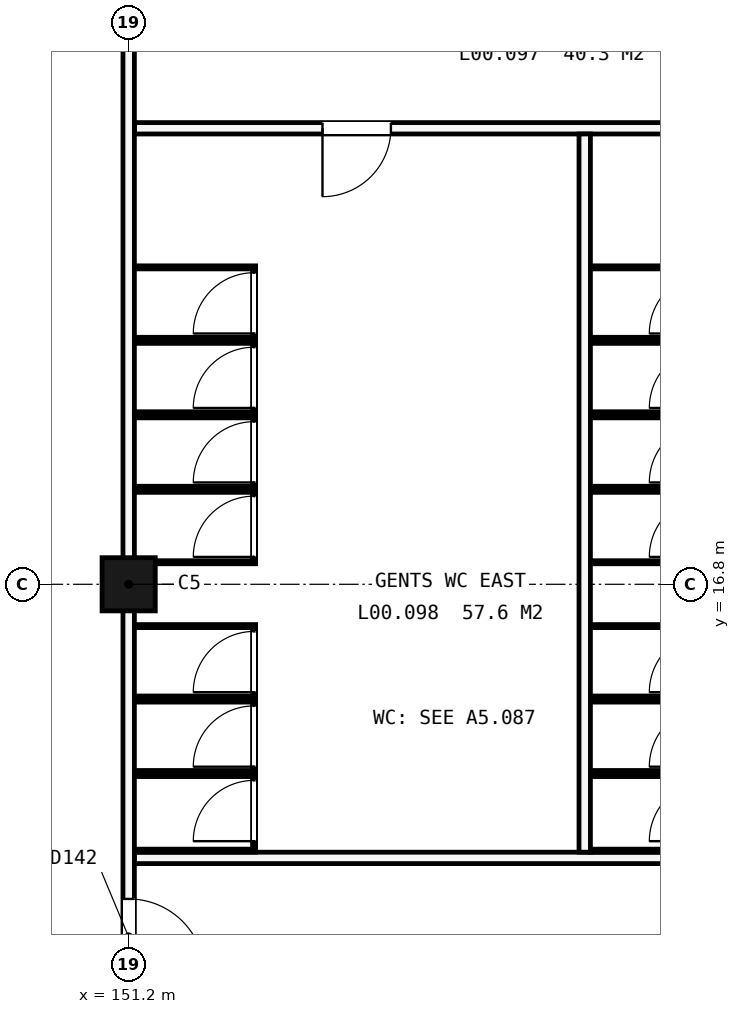
"""IFC4 building model, lengths in metres.
Left out: names, types, materials, properties, quantities, classifications, styles, units other than length and angle.
Written with IfcOpenShell. Run it as: python <this file> out.ifc"""

import sys

from ifc_helpers import new_model, si_unit, direction, frame, frame_2d, origin, origin_2d, place, context, subcontext, project, spatial, rectangle, extrude, element, fill, save


model = new_model("IFC4")
c1 = context("Model", 3, precision=1e-05, world=origin(), true_north=direction((0.0, 1.0)))
c2 = subcontext(c1, "Body", "Model", "MODEL_VIEW")
j1 = project(units=[si_unit("LENGTHUNIT", "METRE"), si_unit("PLANEANGLEUNIT", "RADIAN")], contexts=[c1])
p1 = place(None, origin())
s1 = spatial("IfcSite", under=j1, at=p1, CompositionType="ELEMENT")
p2 = place(p1, origin())
s2 = spatial("IfcBuilding", under=s1, at=p2, CompositionType="ELEMENT")
p3 = place(p2, origin())
s3 = spatial("IfcBuildingStorey", under=s2, at=p3, CompositionType="ELEMENT", Elevation=0.0)
p4 = place(p3, frame((151.2, 16.8, -0.3), z_axis=(0.0, 0.0, 1.0), x_axis=(1.0, 0.0, 0.0)))
e1 = element("IfcColumn", 1, at=p4, inside=s3, PredefinedType="COLUMN", context=c2, shape_type="SweptSolid", body=[
    extrude(rectangle(XDim=0.7, YDim=0.7, at=origin_2d()), origin(), (0.0, 0.0, 1.0), 5.4),
])
p5 = place(p3, frame((151.275, 13.2, 0.0), z_axis=(0.0, 0.0, 1.0), x_axis=(1.0, 0.0, 0.0)))
e2 = element("IfcWall", 2, at=p5, inside=s3, PredefinedType="PARTITIONING", context=c2, shape_type="SweptSolid", body=[
    extrude(rectangle(XDim=16.55, YDim=0.15, at=frame_2d((8.275, 0.0))), origin(), (0.0, 0.0, 1.0), 5.1),
])
p6 = place(p5, frame((13.825, 0.0, 0.0)))
e3 = element("IfcOpeningElement", 3, at=p6, cuts=e2, PredefinedType="OPENING", context=c2, shape_type="SweptSolid", body=[
    extrude(rectangle(XDim=1.0, YDim=2.1, at=frame_2d((0.5, 1.05))), frame((0.0, 0.085, 0.0), z_axis=(0.0, -1.0, 0.0), x_axis=(1.0, 0.0, 0.0)), (0.0, 0.0, 1.0), 0.17),
])
p7 = place(p3, frame((151.275, 22.8, 0.0), z_axis=(0.0, 0.0, 1.0), x_axis=(1.0, 0.0, 0.0)))
e4 = element("IfcWall", 4, at=p7, inside=s3, PredefinedType="PARTITIONING", context=c2, shape_type="SweptSolid", body=[
    extrude(rectangle(XDim=16.55, YDim=0.15, at=frame_2d((8.275, 0.0))), origin(), (0.0, 0.0, 1.0), 5.1),
])
p8 = place(p7, frame((2.475, 0.0, 0.0)))
e5 = element("IfcOpeningElement", 5, at=p8, cuts=e4, PredefinedType="OPENING", context=c2, shape_type="SweptSolid", body=[
    extrude(rectangle(XDim=0.9, YDim=2.1, at=frame_2d((0.45, 1.05))), frame((0.0, 0.085, 0.0), z_axis=(0.0, -1.0, 0.0), x_axis=(1.0, 0.0, 0.0)), (0.0, 0.0, 1.0), 0.17),
])
p9 = place(p7, frame((8.475, 0.0, 0.0)))
e6 = element("IfcOpeningElement", 6, at=p9, cuts=e4, PredefinedType="OPENING", context=c2, shape_type="SweptSolid", body=[
    extrude(rectangle(XDim=0.9, YDim=2.1, at=frame_2d((0.45, 1.05))), frame((0.0, 0.085, 0.0), z_axis=(0.0, -1.0, 0.0), x_axis=(1.0, 0.0, 0.0)), (0.0, 0.0, 1.0), 0.17),
])
p10 = place(p7, frame((13.8, 0.0, 0.0)))
e7 = element("IfcOpeningElement", 7, at=p10, cuts=e4, PredefinedType="OPENING", context=c2, shape_type="SweptSolid", body=[
    extrude(rectangle(XDim=1.05, YDim=2.25, at=frame_2d((0.525, 1.125))), frame((0.0, 0.085, 0.0), z_axis=(0.0, -1.0, 0.0), x_axis=(1.0, 0.0, 0.0)), (0.0, 0.0, 1.0), 0.17),
])
p11 = place(p3, frame((151.2, 8.5, 0.0), z_axis=(0.0, 0.0, 1.0), x_axis=(0.0, 1.0, 0.0)))
e8 = element("IfcWall", 8, at=p11, inside=s3, PredefinedType="PARTITIONING", context=c2, shape_type="SweptSolid", body=[
    extrude(rectangle(XDim=16.625, YDim=0.15, at=frame_2d((8.312, 0.0))), origin(), (0.0, 0.0, 1.0), 4.3),
])
p12 = place(p11, frame((3.16, 0.0, 0.0)))
e9 = element("IfcOpeningElement", 9, at=p12, cuts=e8, PredefinedType="OPENING", context=c2, shape_type="SweptSolid", body=[
    extrude(rectangle(XDim=1.0, YDim=2.1, at=frame_2d((0.5, 1.05))), frame((0.0, 0.085, 0.0), z_axis=(0.0, -1.0, 0.0), x_axis=(1.0, 0.0, 0.0)), (0.0, 0.0, 1.0), 0.17),
])
p13 = place(p3, frame((157.2, 13.275, 0.0), z_axis=(0.0, 0.0, 1.0), x_axis=(0.0, 1.0, 0.0)))
e10 = element("IfcWall", 10, at=p13, inside=s3, PredefinedType="PARTITIONING", context=c2, shape_type="SweptSolid", body=[
    extrude(rectangle(XDim=9.45, YDim=0.15, at=frame_2d((4.725, 0.0))), origin(), (0.0, 0.0, 1.0), 5.1),
])
for number, where, z_axis, x_axis in (
    (11, (151.275, 13.295, 0.0), (0.0, 0.0, 1.0), (1.0, 0.0, 0.0)),
    (12, (151.275, 14.29, 0.0), (0.0, 0.0, 1.0), (1.0, 0.0, 0.0)),
):
    element("IfcWall", number, at=place(p3, frame(where, z_axis=z_axis, x_axis=x_axis)), inside=s3, PredefinedType="PARTITIONING", context=c2, shape_type="SweptSolid", body=[
        extrude(rectangle(XDim=1.595, YDim=0.04, at=frame_2d((0.798, 0.0))), origin(), (0.0, 0.0, 1.0), 2.0),
    ])
p14 = place(p3, frame((152.85, 13.315, 0.0), z_axis=(0.0, 0.0, 1.0), x_axis=(0.0, 1.0, 0.0)))
e13 = element("IfcWall", 13, at=p14, inside=s3, PredefinedType="PARTITIONING", context=c2, shape_type="SweptSolid", body=[
    extrude(rectangle(XDim=0.955, YDim=0.04, at=frame_2d((0.478, 0.0))), origin(), (0.0, 0.0, 1.0), 2.0),
])
p15 = place(p14, frame((0.105, 0.0, 0.0)))
e14 = element("IfcOpeningElement", 14, at=p15, cuts=e13, PredefinedType="OPENING", context=c2, shape_type="SweptSolid", body=[
    extrude(rectangle(XDim=0.8, YDim=2.0, at=frame_2d((0.4, 1.0))), frame((0.0, 0.03, 0.0), z_axis=(0.0, -1.0, 0.0), x_axis=(1.0, 0.0, 0.0)), (0.0, 0.0, 1.0), 0.06),
])
for number, where, z_axis, x_axis in (
    (15, (151.275, 14.33, 0.0), (0.0, 0.0, 1.0), (1.0, 0.0, 0.0)),
    (16, (151.275, 15.27, 0.0), (0.0, 0.0, 1.0), (1.0, 0.0, 0.0)),
):
    element("IfcWall", number, at=place(p3, frame(where, z_axis=z_axis, x_axis=x_axis)), inside=s3, PredefinedType="PARTITIONING", context=c2, shape_type="SweptSolid", body=[
        extrude(rectangle(XDim=1.595, YDim=0.04, at=frame_2d((0.798, 0.0))), origin(), (0.0, 0.0, 1.0), 2.0),
    ])
p16 = place(p3, frame((152.85, 14.35, 0.0), z_axis=(0.0, 0.0, 1.0), x_axis=(0.0, 1.0, 0.0)))
e17 = element("IfcWall", 17, at=p16, inside=s3, PredefinedType="PARTITIONING", context=c2, shape_type="SweptSolid", body=[
    extrude(rectangle(XDim=0.9, YDim=0.04, at=frame_2d((0.45, 0.0))), origin(), (0.0, 0.0, 1.0), 2.0),
])
p17 = place(p16, frame((0.05, 0.0, 0.0)))
e18 = element("IfcOpeningElement", 18, at=p17, cuts=e17, PredefinedType="OPENING", context=c2, shape_type="SweptSolid", body=[
    extrude(rectangle(XDim=0.8, YDim=2.0, at=frame_2d((0.4, 1.0))), frame((0.0, 0.03, 0.0), z_axis=(0.0, -1.0, 0.0), x_axis=(1.0, 0.0, 0.0)), (0.0, 0.0, 1.0), 0.06),
])
for number, where, z_axis, x_axis in (
    (19, (151.275, 15.31, 0.0), (0.0, 0.0, 1.0), (1.0, 0.0, 0.0)),
    (20, (151.275, 16.25, 0.0), (0.0, 0.0, 1.0), (1.0, 0.0, 0.0)),
):
    element("IfcWall", number, at=place(p3, frame(where, z_axis=z_axis, x_axis=x_axis)), inside=s3, PredefinedType="PARTITIONING", context=c2, shape_type="SweptSolid", body=[
        extrude(rectangle(XDim=1.595, YDim=0.04, at=frame_2d((0.798, 0.0))), origin(), (0.0, 0.0, 1.0), 2.0),
    ])
p18 = place(p3, frame((152.85, 15.33, 0.0), z_axis=(0.0, 0.0, 1.0), x_axis=(0.0, 1.0, 0.0)))
e21 = element("IfcWall", 21, at=p18, inside=s3, PredefinedType="PARTITIONING", context=c2, shape_type="SweptSolid", body=[
    extrude(rectangle(XDim=0.9, YDim=0.04, at=frame_2d((0.45, 0.0))), origin(), (0.0, 0.0, 1.0), 2.0),
])
p19 = place(p18, frame((0.05, 0.0, 0.0)))
e22 = element("IfcOpeningElement", 22, at=p19, cuts=e21, PredefinedType="OPENING", context=c2, shape_type="SweptSolid", body=[
    extrude(rectangle(XDim=0.8, YDim=2.0, at=frame_2d((0.4, 1.0))), frame((0.0, 0.03, 0.0), z_axis=(0.0, -1.0, 0.0), x_axis=(1.0, 0.0, 0.0)), (0.0, 0.0, 1.0), 0.06),
])
for number, where, z_axis, x_axis in (
    (23, (151.275, 17.09, 0.0), (0.0, 0.0, 1.0), (1.0, 0.0, 0.0)),
    (24, (151.275, 18.03, 0.0), (0.0, 0.0, 1.0), (1.0, 0.0, 0.0)),
):
    element("IfcWall", number, at=place(p3, frame(where, z_axis=z_axis, x_axis=x_axis)), inside=s3, PredefinedType="PARTITIONING", context=c2, shape_type="SweptSolid", body=[
        extrude(rectangle(XDim=1.595, YDim=0.04, at=frame_2d((0.798, 0.0))), origin(), (0.0, 0.0, 1.0), 2.0),
    ])
p20 = place(p3, frame((152.85, 17.11, 0.0), z_axis=(0.0, 0.0, 1.0), x_axis=(0.0, 1.0, 0.0)))
e25 = element("IfcWall", 25, at=p20, inside=s3, PredefinedType="PARTITIONING", context=c2, shape_type="SweptSolid", body=[
    extrude(rectangle(XDim=0.9, YDim=0.04, at=frame_2d((0.45, 0.0))), origin(), (0.0, 0.0, 1.0), 2.0),
])
p21 = place(p20, frame((0.05, 0.0, 0.0)))
e26 = element("IfcOpeningElement", 26, at=p21, cuts=e25, PredefinedType="OPENING", context=c2, shape_type="SweptSolid", body=[
    extrude(rectangle(XDim=0.8, YDim=2.0, at=frame_2d((0.4, 1.0))), frame((0.0, 0.03, 0.0), z_axis=(0.0, -1.0, 0.0), x_axis=(1.0, 0.0, 0.0)), (0.0, 0.0, 1.0), 0.06),
])
for number, where, z_axis, x_axis in (
    (27, (151.275, 18.07, 0.0), (0.0, 0.0, 1.0), (1.0, 0.0, 0.0)),
    (28, (151.275, 19.01, 0.0), (0.0, 0.0, 1.0), (1.0, 0.0, 0.0)),
):
    element("IfcWall", number, at=place(p3, frame(where, z_axis=z_axis, x_axis=x_axis)), inside=s3, PredefinedType="PARTITIONING", context=c2, shape_type="SweptSolid", body=[
        extrude(rectangle(XDim=1.595, YDim=0.04, at=frame_2d((0.798, 0.0))), origin(), (0.0, 0.0, 1.0), 2.0),
    ])
p22 = place(p3, frame((152.85, 18.09, 0.0), z_axis=(0.0, 0.0, 1.0), x_axis=(0.0, 1.0, 0.0)))
e29 = element("IfcWall", 29, at=p22, inside=s3, PredefinedType="PARTITIONING", context=c2, shape_type="SweptSolid", body=[
    extrude(rectangle(XDim=0.9, YDim=0.04, at=frame_2d((0.45, 0.0))), origin(), (0.0, 0.0, 1.0), 2.0),
])
p23 = place(p22, frame((0.05, 0.0, 0.0)))
e30 = element("IfcOpeningElement", 30, at=p23, cuts=e29, PredefinedType="OPENING", context=c2, shape_type="SweptSolid", body=[
    extrude(rectangle(XDim=0.8, YDim=2.0, at=frame_2d((0.4, 1.0))), frame((0.0, 0.03, 0.0), z_axis=(0.0, -1.0, 0.0), x_axis=(1.0, 0.0, 0.0)), (0.0, 0.0, 1.0), 0.06),
])
for number, where, z_axis, x_axis in (
    (31, (151.275, 19.05, 0.0), (0.0, 0.0, 1.0), (1.0, 0.0, 0.0)),
    (32, (151.275, 19.99, 0.0), (0.0, 0.0, 1.0), (1.0, 0.0, 0.0)),
):
    element("IfcWall", number, at=place(p3, frame(where, z_axis=z_axis, x_axis=x_axis)), inside=s3, PredefinedType="PARTITIONING", context=c2, shape_type="SweptSolid", body=[
        extrude(rectangle(XDim=1.595, YDim=0.04, at=frame_2d((0.798, 0.0))), origin(), (0.0, 0.0, 1.0), 2.0),
    ])
p24 = place(p3, frame((152.85, 19.07, 0.0), z_axis=(0.0, 0.0, 1.0), x_axis=(0.0, 1.0, 0.0)))
e33 = element("IfcWall", 33, at=p24, inside=s3, PredefinedType="PARTITIONING", context=c2, shape_type="SweptSolid", body=[
    extrude(rectangle(XDim=0.9, YDim=0.04, at=frame_2d((0.45, 0.0))), origin(), (0.0, 0.0, 1.0), 2.0),
])
p25 = place(p24, frame((0.05, 0.0, 0.0)))
e34 = element("IfcOpeningElement", 34, at=p25, cuts=e33, PredefinedType="OPENING", context=c2, shape_type="SweptSolid", body=[
    extrude(rectangle(XDim=0.8, YDim=2.0, at=frame_2d((0.4, 1.0))), frame((0.0, 0.03, 0.0), z_axis=(0.0, -1.0, 0.0), x_axis=(1.0, 0.0, 0.0)), (0.0, 0.0, 1.0), 0.06),
])
for number, where, z_axis, x_axis in (
    (35, (151.275, 20.03, 0.0), (0.0, 0.0, 1.0), (1.0, 0.0, 0.0)),
    (36, (151.275, 20.97, 0.0), (0.0, 0.0, 1.0), (1.0, 0.0, 0.0)),
):
    element("IfcWall", number, at=place(p3, frame(where, z_axis=z_axis, x_axis=x_axis)), inside=s3, PredefinedType="PARTITIONING", context=c2, shape_type="SweptSolid", body=[
        extrude(rectangle(XDim=1.595, YDim=0.04, at=frame_2d((0.798, 0.0))), origin(), (0.0, 0.0, 1.0), 2.0),
    ])
p26 = place(p3, frame((152.85, 20.05, 0.0), z_axis=(0.0, 0.0, 1.0), x_axis=(0.0, 1.0, 0.0)))
e37 = element("IfcWall", 37, at=p26, inside=s3, PredefinedType="PARTITIONING", context=c2, shape_type="SweptSolid", body=[
    extrude(rectangle(XDim=0.9, YDim=0.04, at=frame_2d((0.45, 0.0))), origin(), (0.0, 0.0, 1.0), 2.0),
])
p27 = place(p26, frame((0.05, 0.0, 0.0)))
e38 = element("IfcOpeningElement", 38, at=p27, cuts=e37, PredefinedType="OPENING", context=c2, shape_type="SweptSolid", body=[
    extrude(rectangle(XDim=0.8, YDim=2.0, at=frame_2d((0.4, 1.0))), frame((0.0, 0.03, 0.0), z_axis=(0.0, -1.0, 0.0), x_axis=(1.0, 0.0, 0.0)), (0.0, 0.0, 1.0), 0.06),
])
for number, where, z_axis, x_axis in (
    (39, (157.275, 13.295, 0.0), (0.0, 0.0, 1.0), (1.0, 0.0, 0.0)),
    (40, (157.275, 14.29, 0.0), (0.0, 0.0, 1.0), (1.0, 0.0, 0.0)),
    (41, (157.275, 14.33, 0.0), (0.0, 0.0, 1.0), (1.0, 0.0, 0.0)),
    (42, (157.275, 15.27, 0.0), (0.0, 0.0, 1.0), (1.0, 0.0, 0.0)),
    (43, (157.275, 15.31, 0.0), (0.0, 0.0, 1.0), (1.0, 0.0, 0.0)),
    (44, (157.275, 16.25, 0.0), (0.0, 0.0, 1.0), (1.0, 0.0, 0.0)),
    (45, (157.275, 17.09, 0.0), (0.0, 0.0, 1.0), (1.0, 0.0, 0.0)),
    (46, (157.275, 18.03, 0.0), (0.0, 0.0, 1.0), (1.0, 0.0, 0.0)),
    (47, (157.275, 18.07, 0.0), (0.0, 0.0, 1.0), (1.0, 0.0, 0.0)),
    (48, (157.275, 19.01, 0.0), (0.0, 0.0, 1.0), (1.0, 0.0, 0.0)),
    (49, (157.275, 19.05, 0.0), (0.0, 0.0, 1.0), (1.0, 0.0, 0.0)),
    (50, (157.275, 19.99, 0.0), (0.0, 0.0, 1.0), (1.0, 0.0, 0.0)),
    (51, (157.275, 20.03, 0.0), (0.0, 0.0, 1.0), (1.0, 0.0, 0.0)),
    (52, (157.275, 20.97, 0.0), (0.0, 0.0, 1.0), (1.0, 0.0, 0.0)),
):
    element("IfcWall", number, at=place(p3, frame(where, z_axis=z_axis, x_axis=x_axis)), inside=s3, PredefinedType="PARTITIONING", context=c2, shape_type="SweptSolid", body=[
        extrude(rectangle(XDim=1.595, YDim=0.04, at=frame_2d((0.798, 0.0))), origin(), (0.0, 0.0, 1.0), 2.0),
    ])
p28 = place(p8, origin())
e53 = element("IfcDoor", 53, at=p28, inside=s3, OperationType="SINGLE_SWING_LEFT", PredefinedType="DOOR", context=c2, shape_type="SweptSolid", body=[
    extrude(rectangle(XDim=0.9, YDim=2.1, at=frame_2d((0.45, 1.05))), frame((0.0, 0.025, 0.0), z_axis=(0.0, -1.0, 0.0), x_axis=(1.0, 0.0, 0.0)), (0.0, 0.0, 1.0), 0.05),
])
fill(e5, e53)
p29 = place(p12, origin())
e54 = element("IfcDoor", 54, at=p29, inside=s3, OperationType="SINGLE_SWING_LEFT", PredefinedType="DOOR", context=c2, shape_type="SweptSolid", body=[
    extrude(rectangle(XDim=1.0, YDim=2.1, at=frame_2d((0.5, 1.05))), frame((0.0, 0.025, 0.0), z_axis=(0.0, -1.0, 0.0), x_axis=(1.0, 0.0, 0.0)), (0.0, 0.0, 1.0), 0.05),
])
fill(e9, e54)
p30 = place(p15, origin())
e55 = element("IfcDoor", 55, at=p30, inside=s3, OperationType="SINGLE_SWING_LEFT", PredefinedType="DOOR", context=c2, shape_type="SweptSolid", body=[
    extrude(rectangle(XDim=0.8, YDim=2.0, at=frame_2d((0.4, 1.0))), frame((0.0, 0.02, 0.0), z_axis=(0.0, -1.0, 0.0), x_axis=(1.0, 0.0, 0.0)), (0.0, 0.0, 1.0), 0.04),
])
fill(e14, e55)
p31 = place(p17, origin())
e56 = element("IfcDoor", 56, at=p31, inside=s3, OperationType="SINGLE_SWING_LEFT", PredefinedType="DOOR", context=c2, shape_type="SweptSolid", body=[
    extrude(rectangle(XDim=0.8, YDim=2.0, at=frame_2d((0.4, 1.0))), frame((0.0, 0.02, 0.0), z_axis=(0.0, -1.0, 0.0), x_axis=(1.0, 0.0, 0.0)), (0.0, 0.0, 1.0), 0.04),
])
fill(e18, e56)
p32 = place(p19, origin())
e57 = element("IfcDoor", 57, at=p32, inside=s3, OperationType="SINGLE_SWING_LEFT", PredefinedType="DOOR", context=c2, shape_type="SweptSolid", body=[
    extrude(rectangle(XDim=0.8, YDim=2.0, at=frame_2d((0.4, 1.0))), frame((0.0, 0.02, 0.0), z_axis=(0.0, -1.0, 0.0), x_axis=(1.0, 0.0, 0.0)), (0.0, 0.0, 1.0), 0.04),
])
fill(e22, e57)
p33 = place(p21, origin())
e58 = element("IfcDoor", 58, at=p33, inside=s3, OperationType="SINGLE_SWING_LEFT", PredefinedType="DOOR", context=c2, shape_type="SweptSolid", body=[
    extrude(rectangle(XDim=0.8, YDim=2.0, at=frame_2d((0.4, 1.0))), frame((0.0, 0.02, 0.0), z_axis=(0.0, -1.0, 0.0), x_axis=(1.0, 0.0, 0.0)), (0.0, 0.0, 1.0), 0.04),
])
fill(e26, e58)
p34 = place(p23, origin())
e59 = element("IfcDoor", 59, at=p34, inside=s3, OperationType="SINGLE_SWING_LEFT", PredefinedType="DOOR", context=c2, shape_type="SweptSolid", body=[
    extrude(rectangle(XDim=0.8, YDim=2.0, at=frame_2d((0.4, 1.0))), frame((0.0, 0.02, 0.0), z_axis=(0.0, -1.0, 0.0), x_axis=(1.0, 0.0, 0.0)), (0.0, 0.0, 1.0), 0.04),
])
fill(e30, e59)
p35 = place(p25, origin())
e60 = element("IfcDoor", 60, at=p35, inside=s3, OperationType="SINGLE_SWING_LEFT", PredefinedType="DOOR", context=c2, shape_type="SweptSolid", body=[
    extrude(rectangle(XDim=0.8, YDim=2.0, at=frame_2d((0.4, 1.0))), frame((0.0, 0.02, 0.0), z_axis=(0.0, -1.0, 0.0), x_axis=(1.0, 0.0, 0.0)), (0.0, 0.0, 1.0), 0.04),
])
fill(e34, e60)
p36 = place(p27, origin())
e61 = element("IfcDoor", 61, at=p36, inside=s3, OperationType="SINGLE_SWING_LEFT", PredefinedType="DOOR", context=c2, shape_type="SweptSolid", body=[
    extrude(rectangle(XDim=0.8, YDim=2.0, at=frame_2d((0.4, 1.0))), frame((0.0, 0.02, 0.0), z_axis=(0.0, -1.0, 0.0), x_axis=(1.0, 0.0, 0.0)), (0.0, 0.0, 1.0), 0.04),
])
fill(e38, e61)
save(model, sys.argv[1])
